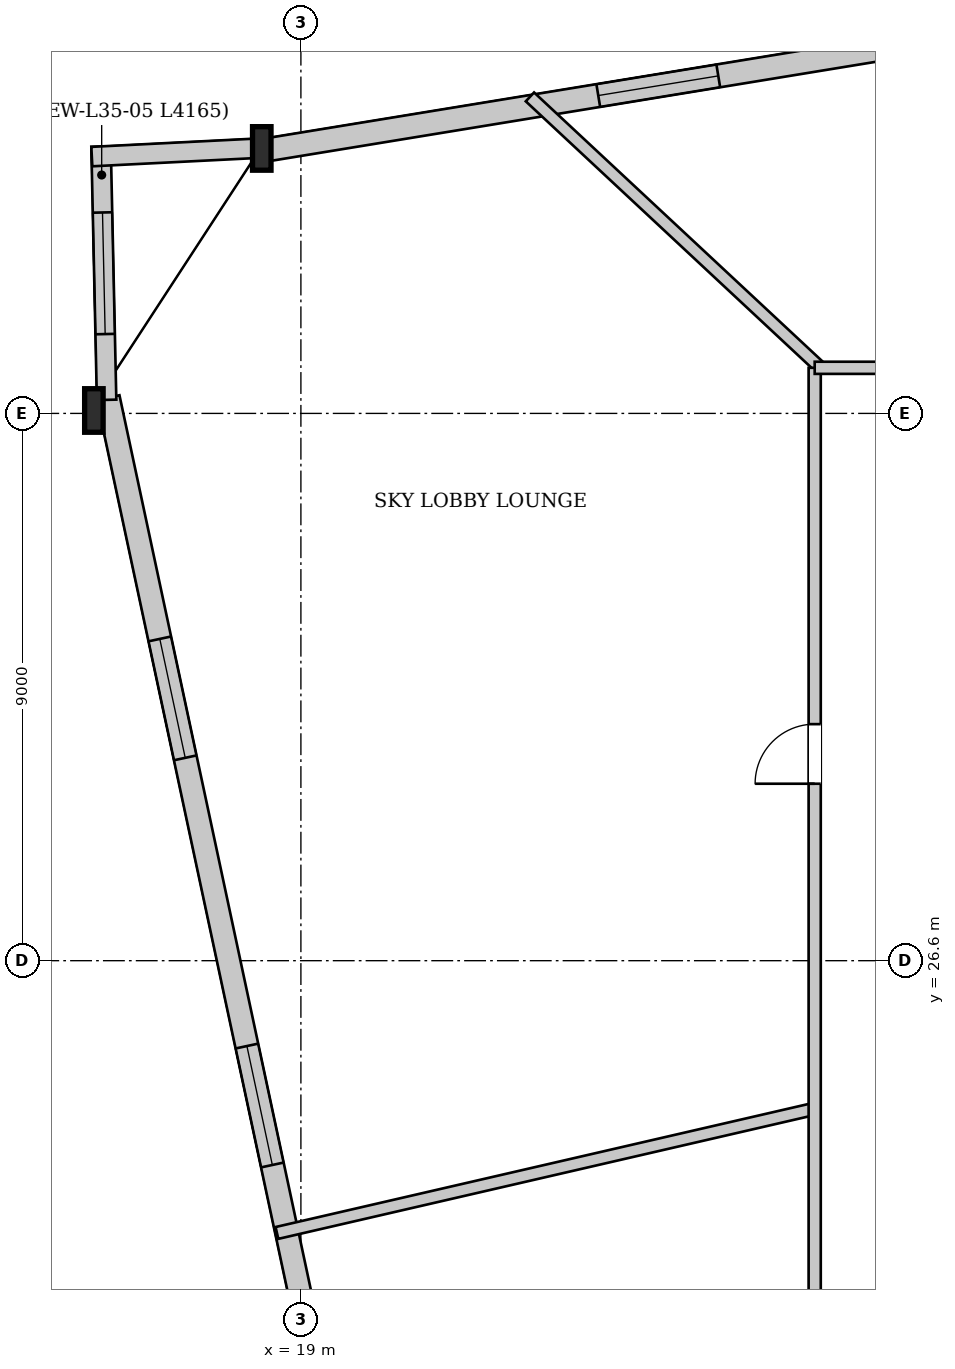
"""IFC4 building model, lengths in metres.
Left out: names, types, materials, properties, quantities, classifications, styles, units other than length and angle.
Written with IfcOpenShell. Run it as: python <this file> out.ifc"""

import sys

from ifc_helpers import new_model, si_unit, direction, frame, frame_2d, origin, origin_2d, place, context, subcontext, project, spatial, rectangle, i_section, extrude, source, transform, mapped, element, fill, save


model = new_model("IFC4")
c1 = context("Model", 3, precision=1e-05, world=origin(), true_north=direction((0.0, 1.0)))
c2 = subcontext(c1, "Body", "Model", "MODEL_VIEW")
j1 = project(units=[si_unit("LENGTHUNIT", "METRE"), si_unit("PLANEANGLEUNIT", "RADIAN")], contexts=[c1])
p1 = place(None, origin())
s1 = spatial("IfcSite", under=j1, at=p1, CompositionType="ELEMENT")
p2 = place(p1, origin())
s2 = spatial("IfcBuilding", under=s1, at=p2, CompositionType="ELEMENT")
p3 = place(p2, frame((0.0, 0.0, 134.1)))
s3 = spatial("IfcBuildingStorey", under=s2, at=p3, CompositionType="ELEMENT", Elevation=134.1)
m1 = source(origin(), c2, "Body", "SweptSolid", [
    extrude(i_section(OverallWidth=0.304, OverallDepth=0.716, WebThickness=0.021, FlangeThickness=0.04, at=origin_2d()), origin(), (0.0, 0.0, 1.0), 3.855),
])
p4 = place(p3, frame((18.454, 40.129, 0.0), z_axis=(-0.050471458209, -0.089164131942, 0.994737346982), x_axis=(0.870251855755, -0.492607051873, 0.0)))
e1 = element("IfcColumn", 1, at=p4, inside=s3, PredefinedType="COLUMN", context=c2, shape_type="MappedRepresentation", body=[
    mapped(m1, transform((0.0, 0.0, 0.0), x_axis=(1.0, 0.0, 0.0), y_axis=(0.0, 1.0, 0.0), z_axis=(0.0, 0.0, 1.0), scale=1.0)),
])
m2 = source(origin(), c2, "Body", "SweptSolid", [
    extrude(i_section(OverallWidth=0.304, OverallDepth=0.716, WebThickness=0.021, FlangeThickness=0.04, at=origin_2d()), origin(), (0.0, 0.0, 1.0), 3.852),
])
p5 = place(p3, frame((15.645, 35.82, 0.0), z_axis=(-0.025545505821, -0.088997246086, 0.995704231849), x_axis=(0.961187384498, -0.275896378884, 0.0)))
e2 = element("IfcColumn", 2, at=p5, inside=s3, PredefinedType="COLUMN", context=c2, shape_type="MappedRepresentation", body=[
    mapped(m2, transform((0.0, 0.0, 0.0), x_axis=(1.0, 0.0, 0.0), y_axis=(0.0, 1.0, 0.0), z_axis=(0.0, 0.0, 1.0), scale=1.0)),
])
p6 = place(p3, frame((19.609, 18.198, 0.0), z_axis=(0.0, 0.0, 1.0), x_axis=(-0.209230911942, 0.977866261555, 0.0)))
e3 = element("IfcWall", 3, at=p6, inside=s3, PredefinedType="SOLIDWALL", context=c2, shape_type="SweptSolid", body=[
    extrude(rectangle(XDim=18.062, YDim=0.38, at=frame_2d((9.031, 0.0))), origin(), (0.0, 0.0, 1.0), 3.142),
])
p7 = place(p6, frame((5.157, 0.0, 0.222)))
e4 = element("IfcOpeningElement", 4, at=p7, cuts=e3, PredefinedType="OPENING", context=c2, shape_type="SweptSolid", body=[
    extrude(rectangle(XDim=2.0, YDim=2.8, at=frame_2d((1.0, 1.4))), frame((0.0, 0.2, 0.0), z_axis=(0.0, -1.0, 0.0), x_axis=(1.0, 0.0, 0.0)), (0.0, 0.0, 1.0), 0.4),
])
p8 = place(p6, frame((12.004, 0.0, 0.222)))
e5 = element("IfcOpeningElement", 5, at=p8, cuts=e3, PredefinedType="OPENING", context=c2, shape_type="SweptSolid", body=[
    extrude(rectangle(XDim=2.0, YDim=2.8, at=frame_2d((1.0, 1.4))), frame((0.0, 0.2, 0.0), z_axis=(0.0, -1.0, 0.0), x_axis=(1.0, 0.0, 0.0)), (0.0, 0.0, 1.0), 0.4),
])
p9 = place(p3, frame((15.804, 35.823, 0.0), z_axis=(0.0, 0.0, 1.0), x_axis=(-0.02186519063, 0.999760928142, 0.0)))
e6 = element("IfcWall", 6, at=p9, inside=s3, PredefinedType="SOLIDWALL", context=c2, shape_type="SweptSolid", body=[
    extrude(rectangle(XDim=4.165, YDim=0.32, at=frame_2d((2.083, 0.0))), origin(), (0.0, 0.0, 1.0), 3.142),
])
p10 = place(p9, frame((1.082, 0.0, 0.222)))
e7 = element("IfcOpeningElement", 7, at=p10, cuts=e6, PredefinedType="OPENING", context=c2, shape_type="SweptSolid", body=[
    extrude(rectangle(XDim=2.0, YDim=2.8, at=frame_2d((1.0, 1.4))), frame((0.0, 0.17, 0.0), z_axis=(0.0, -1.0, 0.0), x_axis=(1.0, 0.0, 0.0)), (0.0, 0.0, 1.0), 0.34),
])
p11 = place(p3, frame((15.562, 39.823, 0.0), z_axis=(0.0, 0.0, 1.0), x_axis=(0.998731286204, 0.050356905761, 0.0)))
e8 = element("IfcWall", 8, at=p11, inside=s3, PredefinedType="SOLIDWALL", context=c2, shape_type="SweptSolid", body=[
    extrude(rectangle(XDim=2.904, YDim=0.32, at=frame_2d((1.452, 0.0))), origin(), (0.0, 0.0, 1.0), 3.142),
])
p12 = place(p3, frame((18.485, 39.942, 0.0), z_axis=(0.0, 0.0, 1.0), x_axis=(0.986854577997, 0.161610772806, 0.0)))
e9 = element("IfcWall", 9, at=p12, inside=s3, PredefinedType="SOLIDWALL", context=c2, shape_type="SweptSolid", body=[
    extrude(rectangle(XDim=23.136, YDim=0.38, at=frame_2d((11.568, 0.0))), origin(), (0.0, 0.0, 1.0), 3.142),
])
p13 = place(p12, frame((5.478, 0.0, 0.222)))
e10 = element("IfcOpeningElement", 10, at=p13, cuts=e9, PredefinedType="OPENING", context=c2, shape_type="SweptSolid", body=[
    extrude(rectangle(XDim=2.0, YDim=2.8, at=frame_2d((1.0, 1.4))), frame((0.0, 0.2, 0.0), z_axis=(0.0, -1.0, 0.0), x_axis=(1.0, 0.0, 0.0)), (0.0, 0.0, 1.0), 0.4),
])
p14 = place(p12, frame((15.658, 0.0, 0.222)))
e11 = element("IfcOpeningElement", 11, at=p14, cuts=e9, PredefinedType="OPENING", context=c2, shape_type="SweptSolid", body=[
    extrude(rectangle(XDim=2.0, YDim=2.8, at=frame_2d((1.0, 1.4))), frame((0.0, 0.2, 0.0), z_axis=(0.0, -1.0, 0.0), x_axis=(1.0, 0.0, 0.0)), (0.0, 0.0, 1.0), 0.4),
])
p15 = place(p3, frame((27.544, 36.35, 0.0), z_axis=(0.0, 0.0, 1.0), x_axis=(-0.731359670855, 0.681991958785, 0.0)))
e12 = element("IfcWall", 12, at=p15, inside=s3, PredefinedType="PARTITIONING", context=c2, shape_type="SweptSolid", body=[
    extrude(rectangle(XDim=6.533, YDim=0.2, at=frame_2d((3.266, 0.0))), origin(), (0.0, 0.0, 1.0), 3.75),
])
p16 = place(p3, frame((27.45, 24.164, 0.0), z_axis=(0.0, 0.0, 1.0), x_axis=(-0.97437124521, -0.224945941303, 0.0)))
e13 = element("IfcWall", 13, at=p16, inside=s3, PredefinedType="PARTITIONING", context=c2, shape_type="SweptSolid", body=[
    extrude(rectangle(XDim=9.077, YDim=0.2, at=frame_2d((4.538, 0.0))), origin(), (0.0, 0.0, 1.0), 3.75),
])
p17 = place(p3, frame((27.45, 16.85, 0.0), z_axis=(0.0, 0.0, 1.0), x_axis=(0.0, 1.0, 0.0)))
e14 = element("IfcWall", 14, at=p17, inside=s3, PredefinedType="PARTITIONING", context=c2, shape_type="SweptSolid", body=[
    extrude(rectangle(XDim=19.5, YDim=0.2, at=frame_2d((9.75, 0.0))), origin(), (0.0, 0.0, 1.0), 3.75),
])
p18 = place(p17, frame((12.66, 0.0, 0.0)))
e15 = element("IfcOpeningElement", 15, at=p18, cuts=e14, PredefinedType="OPENING", context=c2, shape_type="SweptSolid", body=[
    extrude(rectangle(XDim=0.98, YDim=2.15, at=frame_2d((0.49, 1.075))), frame((0.0, 0.11, 0.0), z_axis=(0.0, -1.0, 0.0), x_axis=(1.0, 0.0, 0.0)), (0.0, 0.0, 1.0), 0.22),
])
p19 = place(p3, frame((27.45, 36.35, 0.0), z_axis=(0.0, 0.0, 1.0), x_axis=(1.0, 0.0, 0.0)))
e16 = element("IfcWall", 16, at=p19, inside=s3, PredefinedType="PARTITIONING", context=c2, shape_type="SweptSolid", body=[
    extrude(rectangle(XDim=21.1, YDim=0.2, at=frame_2d((10.55, 0.0))), origin(), (0.0, 0.0, 1.0), 3.75),
])
p20 = place(p19, frame((4.966, 0.0, 0.0)))
e17 = element("IfcOpeningElement", 17, at=p20, cuts=e16, PredefinedType="OPENING", context=c2, shape_type="SweptSolid", body=[
    extrude(rectangle(XDim=1.6, YDim=2.2, at=frame_2d((0.8, 1.1))), frame((0.0, 0.11, 0.0), z_axis=(0.0, -1.0, 0.0), x_axis=(1.0, 0.0, 0.0)), (0.0, 0.0, 1.0), 0.22),
])
p21 = place(p19, frame((19.82, 0.0, 0.0)))
e18 = element("IfcOpeningElement", 18, at=p21, cuts=e16, PredefinedType="OPENING", context=c2, shape_type="SweptSolid", body=[
    extrude(rectangle(XDim=0.98, YDim=2.15, at=frame_2d((0.49, 1.075))), frame((0.0, 0.11, 0.0), z_axis=(0.0, -1.0, 0.0), x_axis=(1.0, 0.0, 0.0)), (0.0, 0.0, 1.0), 0.22),
])
m3 = source(origin(), c2, "Body", "SweptSolid", [
    extrude(rectangle(XDim=2.0, YDim=2.8, at=frame_2d((1.0, 1.4))), frame((0.0, 0.03, 0.0), z_axis=(0.0, -1.0, 0.0), x_axis=(1.0, 0.0, 0.0)), (0.0, 0.0, 1.0), 0.06),
])
p22 = place(p7, origin())
e19 = element("IfcWindow", 19, at=p22, inside=s3, PartitioningType="SINGLE_PANEL", PredefinedType="WINDOW", context=c2, shape_type="MappedRepresentation", body=[
    mapped(m3, transform((0.0, 0.0, 0.0), x_axis=(1.0, 0.0, 0.0), y_axis=(0.0, 1.0, 0.0), z_axis=(0.0, 0.0, 1.0), scale=1.0)),
])
fill(e4, e19)
p23 = place(p8, origin())
e20 = element("IfcWindow", 20, at=p23, inside=s3, PartitioningType="SINGLE_PANEL", PredefinedType="WINDOW", context=c2, shape_type="MappedRepresentation", body=[
    mapped(m3, transform((0.0, 0.0, 0.0), x_axis=(1.0, 0.0, 0.0), y_axis=(0.0, 1.0, 0.0), z_axis=(0.0, 0.0, 1.0), scale=1.0)),
])
fill(e5, e20)
p24 = place(p10, origin())
e21 = element("IfcWindow", 21, at=p24, inside=s3, PartitioningType="SINGLE_PANEL", PredefinedType="WINDOW", context=c2, shape_type="MappedRepresentation", body=[
    mapped(m3, transform((0.0, 0.0, 0.0), x_axis=(1.0, 0.0, 0.0), y_axis=(0.0, 1.0, 0.0), z_axis=(0.0, 0.0, 1.0), scale=1.0)),
])
fill(e7, e21)
p25 = place(p13, origin())
e22 = element("IfcWindow", 22, at=p25, inside=s3, PartitioningType="SINGLE_PANEL", PredefinedType="WINDOW", context=c2, shape_type="MappedRepresentation", body=[
    mapped(m3, transform((0.0, 0.0, 0.0), x_axis=(1.0, 0.0, 0.0), y_axis=(0.0, 1.0, 0.0), z_axis=(0.0, 0.0, 1.0), scale=1.0)),
])
fill(e10, e22)
m4 = source(origin(), c2, "Body", "SweptSolid", [
    extrude(rectangle(XDim=0.98, YDim=2.15, at=frame_2d((0.49, 1.075))), frame((0.0, 0.025, 0.0), z_axis=(0.0, -1.0, 0.0), x_axis=(1.0, 0.0, 0.0)), (0.0, 0.0, 1.0), 0.05),
])
p26 = place(p18, origin())
e23 = element("IfcDoor", 23, at=p26, inside=s3, OperationType="SINGLE_SWING_LEFT", PredefinedType="DOOR", context=c2, shape_type="MappedRepresentation", body=[
    mapped(m4, transform((0.0, 0.0, 0.0), x_axis=(1.0, 0.0, 0.0), y_axis=(0.0, 1.0, 0.0), z_axis=(0.0, 0.0, 1.0), scale=1.0)),
])
fill(e15, e23)
save(model, sys.argv[1])
